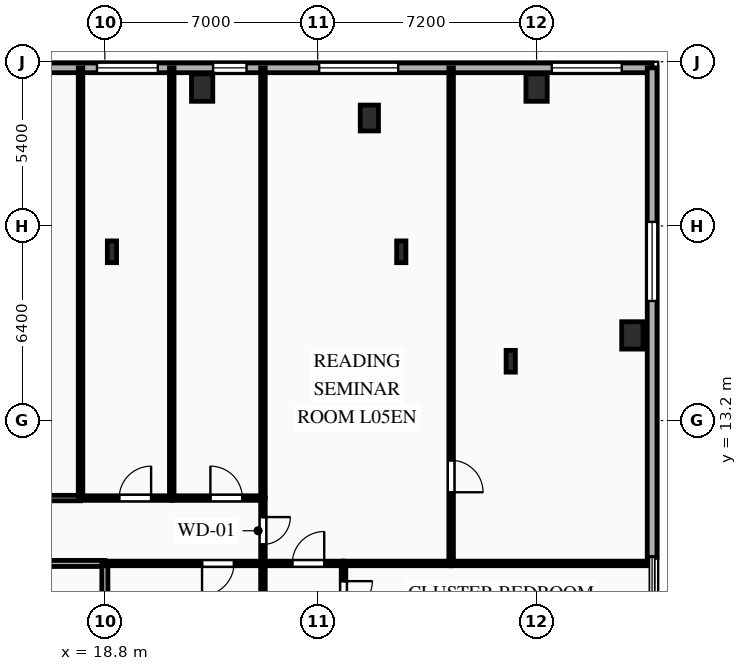
"""IFC4 building model, lengths in metres.
Left out: names, types, materials, properties, quantities, classifications, styles, units other than length and angle.
Written with IfcOpenShell. Run it as: python <this file> out.ifc"""

import sys

from ifc_helpers import new_model, si_unit, direction, frame, frame_2d, origin, origin_2d, place, context, subcontext, project, spatial, rectangle, i_section, extrude, element, fill, save


model = new_model("IFC4")
c1 = context("Model", 3, precision=1e-05, world=origin(), true_north=direction((0.0, 1.0)))
c2 = subcontext(c1, "Body", "Model", "MODEL_VIEW")
j1 = project(units=[si_unit("LENGTHUNIT", "METRE"), si_unit("PLANEANGLEUNIT", "RADIAN")], contexts=[c1])
p1 = place(None, origin())
s1 = spatial("IfcSite", under=j1, at=p1, CompositionType="ELEMENT")
p2 = place(p1, origin())
s2 = spatial("IfcBuilding", under=s1, at=p2, CompositionType="ELEMENT")
p3 = place(p2, frame((0.0, 0.0, 22.5)))
s3 = spatial("IfcBuildingStorey", under=s2, at=p3, CompositionType="ELEMENT", Elevation=22.5)
for number, where, z_axis, x_axis in (
    (1, (22.0, 24.15, 0.0), (0.0, 0.0, 1.0), (1.0, 0.0, 0.0)),
    (2, (33.0, 24.15, 0.0), (0.0, 0.0, 1.0), (1.0, 0.0, 0.0)),
    (3, (36.15, 16.0, 0.0), (0.0, 0.0, 1.0), (1.0, 0.0, 0.0)),
):
    element("IfcColumn", number, at=place(p3, frame(where, z_axis=z_axis, x_axis=x_axis)), inside=s3, PredefinedType="COLUMN", context=c2, shape_type="SweptSolid", body=[
        extrude(rectangle(XDim=0.7, YDim=0.9, at=origin_2d()), origin(), (0.0, 0.0, 1.0), 4.5),
    ])
p4 = place(p3, frame((27.5, 23.15, 0.0), z_axis=(0.0, 0.0, 1.0), x_axis=(1.0, 0.0, 0.0)))
e4 = element("IfcColumn", 4, at=p4, inside=s3, PredefinedType="PILASTER", context=c2, shape_type="SweptSolid", body=[
    extrude(rectangle(XDim=0.6, YDim=0.85, at=origin_2d()), origin(), (0.0, 0.0, 1.0), 4.5),
])
for number, where, z_axis, x_axis in (
    (5, (28.55, 18.75, 0.0), (0.0, 0.0, 1.0), (1.0, 0.0, 0.0)),
    (6, (19.033, 18.75, 0.0), (0.0, 0.0, 1.0), (1.0, 0.0, 0.0)),
    (7, (32.15, 15.15, 0.0), (0.0, 0.0, 1.0), (1.0, 0.0, 0.0)),
):
    element("IfcColumn", number, at=place(p3, frame(where, z_axis=z_axis, x_axis=x_axis)), inside=s3, PredefinedType="COLUMN", context=c2, shape_type="SweptSolid", body=[
        extrude(i_section(OverallWidth=0.304, OverallDepth=0.716, WebThickness=0.021, FlangeThickness=0.04, FilletRadius=0.027, at=origin_2d()), origin(), (0.0, 0.0, 1.0), 4.5),
    ])
p5 = place(p3, frame((-36.8, 24.8, 0.0), z_axis=(0.0, 0.0, 1.0), x_axis=(1.0, 0.0, 0.0)))
e8 = element("IfcWall", 8, at=p5, inside=s3, PredefinedType="SOLIDWALL", context=c2, shape_type="SweptSolid", body=[
    extrude(rectangle(XDim=73.6, YDim=0.32, at=frame_2d((36.8, 0.0))), origin(), (0.0, 0.0, 1.0), 4.16),
])
p6 = place(p5, frame((1.079, 0.0, 0.85)))
e9 = element("IfcOpeningElement", 9, at=p6, cuts=e8, PredefinedType="OPENING", context=c2, shape_type="SweptSolid", body=[
    extrude(rectangle(XDim=2.3, YDim=2.4, at=frame_2d((1.15, 1.2))), frame((0.0, 0.17, 0.0), z_axis=(0.0, -1.0, 0.0), x_axis=(1.0, 0.0, 0.0)), (0.0, 0.0, 1.0), 0.34),
])
p7 = place(p5, frame((8.431, 0.0, 0.85)))
e10 = element("IfcOpeningElement", 10, at=p7, cuts=e8, PredefinedType="OPENING", context=c2, shape_type="SweptSolid", body=[
    extrude(rectangle(XDim=2.6, YDim=2.4, at=frame_2d((1.3, 1.2))), frame((0.0, 0.17, 0.0), z_axis=(0.0, -1.0, 0.0), x_axis=(1.0, 0.0, 0.0)), (0.0, 0.0, 1.0), 0.34),
])
p8 = place(p5, frame((13.316, 0.0, 0.85)))
e11 = element("IfcOpeningElement", 11, at=p8, cuts=e8, PredefinedType="OPENING", context=c2, shape_type="SweptSolid", body=[
    extrude(rectangle(XDim=1.1, YDim=1.85, at=frame_2d((0.55, 0.925))), frame((0.0, 0.17, 0.0), z_axis=(0.0, -1.0, 0.0), x_axis=(1.0, 0.0, 0.0)), (0.0, 0.0, 1.0), 0.34),
])
p9 = place(p5, frame((16.339, 0.0, 0.85)))
e12 = element("IfcOpeningElement", 12, at=p9, cuts=e8, PredefinedType="OPENING", context=c2, shape_type="SweptSolid", body=[
    extrude(rectangle(XDim=2.0, YDim=2.4, at=frame_2d((1.0, 1.2))), frame((0.0, 0.17, 0.0), z_axis=(0.0, -1.0, 0.0), x_axis=(1.0, 0.0, 0.0)), (0.0, 0.0, 1.0), 0.34),
])
p10 = place(p5, frame((21.875, 0.0, 0.85)))
e13 = element("IfcOpeningElement", 13, at=p10, cuts=e8, PredefinedType="OPENING", context=c2, shape_type="SweptSolid", body=[
    extrude(rectangle(XDim=2.3, YDim=2.4, at=frame_2d((1.15, 1.2))), frame((0.0, 0.17, 0.0), z_axis=(0.0, -1.0, 0.0), x_axis=(1.0, 0.0, 0.0)), (0.0, 0.0, 1.0), 0.34),
])
p11 = place(p5, frame((26.53, 0.0, 0.85)))
e14 = element("IfcOpeningElement", 14, at=p11, cuts=e8, PredefinedType="OPENING", context=c2, shape_type="SweptSolid", body=[
    extrude(rectangle(XDim=2.6, YDim=2.4, at=frame_2d((1.3, 1.2))), frame((0.0, 0.17, 0.0), z_axis=(0.0, -1.0, 0.0), x_axis=(1.0, 0.0, 0.0)), (0.0, 0.0, 1.0), 0.34),
])
p12 = place(p5, frame((32.537, 0.0, 0.85)))
e15 = element("IfcOpeningElement", 15, at=p12, cuts=e8, PredefinedType="OPENING", context=c2, shape_type="SweptSolid", body=[
    extrude(rectangle(XDim=2.6, YDim=2.4, at=frame_2d((1.3, 1.2))), frame((0.0, 0.17, 0.0), z_axis=(0.0, -1.0, 0.0), x_axis=(1.0, 0.0, 0.0)), (0.0, 0.0, 1.0), 0.34),
])
p13 = place(p5, frame((38.543, 0.0, 0.85)))
e16 = element("IfcOpeningElement", 16, at=p13, cuts=e8, PredefinedType="OPENING", context=c2, shape_type="SweptSolid", body=[
    extrude(rectangle(XDim=2.6, YDim=2.4, at=frame_2d((1.3, 1.2))), frame((0.0, 0.17, 0.0), z_axis=(0.0, -1.0, 0.0), x_axis=(1.0, 0.0, 0.0)), (0.0, 0.0, 1.0), 0.34),
])
p14 = place(p5, frame((44.55, 0.0, 0.85)))
e17 = element("IfcOpeningElement", 17, at=p14, cuts=e8, PredefinedType="OPENING", context=c2, shape_type="SweptSolid", body=[
    extrude(rectangle(XDim=2.6, YDim=2.4, at=frame_2d((1.3, 1.2))), frame((0.0, 0.17, 0.0), z_axis=(0.0, -1.0, 0.0), x_axis=(1.0, 0.0, 0.0)), (0.0, 0.0, 1.0), 0.34),
])
p15 = place(p5, frame((50.556, 0.0, 0.85)))
e18 = element("IfcOpeningElement", 18, at=p15, cuts=e8, PredefinedType="OPENING", context=c2, shape_type="SweptSolid", body=[
    extrude(rectangle(XDim=2.6, YDim=2.4, at=frame_2d((1.3, 1.2))), frame((0.0, 0.17, 0.0), z_axis=(0.0, -1.0, 0.0), x_axis=(1.0, 0.0, 0.0)), (0.0, 0.0, 1.0), 0.34),
])
p16 = place(p5, frame((55.341, 0.0, 0.85)))
e19 = element("IfcOpeningElement", 19, at=p16, cuts=e8, PredefinedType="OPENING", context=c2, shape_type="SweptSolid", body=[
    extrude(rectangle(XDim=2.0, YDim=2.4, at=frame_2d((1.0, 1.2))), frame((0.0, 0.17, 0.0), z_axis=(0.0, -1.0, 0.0), x_axis=(1.0, 0.0, 0.0)), (0.0, 0.0, 1.0), 0.34),
])
p17 = place(p5, frame((59.16, 0.0, 0.85)))
e20 = element("IfcOpeningElement", 20, at=p17, cuts=e8, PredefinedType="OPENING", context=c2, shape_type="SweptSolid", body=[
    extrude(rectangle(XDim=1.1, YDim=1.85, at=frame_2d((0.55, 0.925))), frame((0.0, 0.17, 0.0), z_axis=(0.0, -1.0, 0.0), x_axis=(1.0, 0.0, 0.0)), (0.0, 0.0, 1.0), 0.34),
])
p18 = place(p5, frame((62.649, 0.0, 0.85)))
e21 = element("IfcOpeningElement", 21, at=p18, cuts=e8, PredefinedType="OPENING", context=c2, shape_type="SweptSolid", body=[
    extrude(rectangle(XDim=2.6, YDim=2.4, at=frame_2d((1.3, 1.2))), frame((0.0, 0.17, 0.0), z_axis=(0.0, -1.0, 0.0), x_axis=(1.0, 0.0, 0.0)), (0.0, 0.0, 1.0), 0.34),
])
p19 = place(p5, frame((70.301, 0.0, 0.85)))
e22 = element("IfcOpeningElement", 22, at=p19, cuts=e8, PredefinedType="OPENING", context=c2, shape_type="SweptSolid", body=[
    extrude(rectangle(XDim=2.3, YDim=2.4, at=frame_2d((1.15, 1.2))), frame((0.0, 0.17, 0.0), z_axis=(0.0, -1.0, 0.0), x_axis=(1.0, 0.0, 0.0)), (0.0, 0.0, 1.0), 0.34),
])
p20 = place(p3, frame((36.8, 24.8, 0.0), z_axis=(0.0, 0.0, 1.0), x_axis=(0.0, -1.0, 0.0)))
e23 = element("IfcWall", 23, at=p20, inside=s3, PredefinedType="SOLIDWALL", context=c2, shape_type="SweptSolid", body=[
    extrude(rectangle(XDim=16.1, YDim=0.32, at=frame_2d((8.05, 0.0))), origin(), (0.0, 0.0, 1.0), 4.16),
])
p21 = place(p20, frame((5.067, 0.0, 0.85)))
e24 = element("IfcOpeningElement", 24, at=p21, cuts=e23, PredefinedType="OPENING", context=c2, shape_type="SweptSolid", body=[
    extrude(rectangle(XDim=2.6, YDim=2.4, at=frame_2d((1.3, 1.2))), frame((0.0, 0.17, 0.0), z_axis=(0.0, -1.0, 0.0), x_axis=(1.0, 0.0, 0.0)), (0.0, 0.0, 1.0), 0.34),
])
p22 = place(p3, frame((18.8, 8.5, 0.0), z_axis=(0.0, 0.0, 1.0), x_axis=(-1.0, 0.0, 0.0)))
e25 = element("IfcWall", 25, at=p22, inside=s3, PredefinedType="PARTITIONING", context=c2, shape_type="SweptSolid", body=[
    extrude(rectangle(XDim=6.8, YDim=0.2, at=frame_2d((3.4, 0.0))), origin(), (0.0, 0.0, 1.0), 4.16),
])
p23 = place(p22, frame((3.985, 0.0, 0.0)))
e26 = element("IfcOpeningElement", 26, at=p23, cuts=e25, PredefinedType="OPENING", context=c2, shape_type="SweptSolid", body=[
    extrude(rectangle(XDim=1.1, YDim=2.15, at=frame_2d((0.55, 1.075))), frame((0.0, 0.11, 0.0), z_axis=(0.0, -1.0, 0.0), x_axis=(1.0, 0.0, 0.0)), (0.0, 0.0, 1.0), 0.22),
])
p24 = place(p3, frame((18.8, 5.6, 0.0), z_axis=(0.0, 0.0, 1.0), x_axis=(0.0, 1.0, 0.0)))
e27 = element("IfcWall", 27, at=p24, inside=s3, PredefinedType="PARTITIONING", context=c2, shape_type="SweptSolid", body=[
    extrude(rectangle(XDim=2.9, YDim=0.2, at=frame_2d((1.45, 0.0))), origin(), (0.0, 0.0, 1.0), 3.645),
])
p25 = place(p3, frame((24.0, 10.65, 0.0), z_axis=(0.0, 0.0, 1.0), x_axis=(0.0, -1.0, 0.0)))
e28 = element("IfcWall", 28, at=p25, inside=s3, PredefinedType="PARTITIONING", context=c2, shape_type="SweptSolid", body=[
    extrude(rectangle(XDim=2.15, YDim=0.15, at=frame_2d((1.075, 0.0))), origin(), (0.0, 0.0, 1.0), 4.16),
])
p26 = place(p25, frame((0.625, 0.0, 0.0)))
e29 = element("IfcOpeningElement", 29, at=p26, cuts=e28, PredefinedType="OPENING", context=c2, shape_type="SweptSolid", body=[
    extrude(rectangle(XDim=0.9, YDim=2.1, at=frame_2d((0.45, 1.05))), frame((0.0, 0.085, 0.0), z_axis=(0.0, -1.0, 0.0), x_axis=(1.0, 0.0, 0.0)), (0.0, 0.0, 1.0), 0.17),
])
p27 = place(p3, frame((24.0, 8.5, 0.0), z_axis=(0.0, 0.0, 1.0), x_axis=(-1.0, 0.0, 0.0)))
e30 = element("IfcWall", 30, at=p27, inside=s3, PredefinedType="PARTITIONING", context=c2, shape_type="SweptSolid", body=[
    extrude(rectangle(XDim=5.2, YDim=0.15, at=frame_2d((2.6, 0.0))), origin(), (0.0, 0.0, 1.0), 4.16),
])
p28 = place(p27, frame((0.954, 0.0, 0.0)))
e31 = element("IfcOpeningElement", 31, at=p28, cuts=e30, PredefinedType="OPENING", context=c2, shape_type="SweptSolid", body=[
    extrude(rectangle(XDim=1.05, YDim=2.15, at=frame_2d((0.525, 1.075))), frame((0.0, 0.085, 0.0), z_axis=(0.0, -1.0, 0.0), x_axis=(1.0, 0.0, 0.0)), (0.0, 0.0, 1.0), 0.17),
])
p29 = place(p3, frame((14.45, 10.65, 0.0), z_axis=(0.0, 0.0, 1.0), x_axis=(1.0, 0.0, 0.0)))
e32 = element("IfcWall", 32, at=p29, inside=s3, PredefinedType="PARTITIONING", context=c2, shape_type="SweptSolid", body=[
    extrude(rectangle(XDim=3.55, YDim=0.18, at=frame_2d((1.775, 0.0))), origin(), (0.0, 0.0, 1.0), 4.16),
])
p30 = place(p29, frame((0.754, 0.0, 0.0)))
e33 = element("IfcOpeningElement", 33, at=p30, cuts=e32, PredefinedType="OPENING", context=c2, shape_type="SweptSolid", body=[
    extrude(rectangle(XDim=1.0, YDim=2.15, at=frame_2d((0.5, 1.075))), frame((0.0, 0.1, 0.0), z_axis=(0.0, -1.0, 0.0), x_axis=(1.0, 0.0, 0.0)), (0.0, 0.0, 1.0), 0.2),
])
p31 = place(p3, frame((18.0, 10.65, 0.0), z_axis=(0.0, 0.0, 1.0), x_axis=(1.0, 0.0, 0.0)))
e34 = element("IfcWall", 34, at=p31, inside=s3, PredefinedType="PARTITIONING", context=c2, shape_type="SweptSolid", body=[
    extrude(rectangle(XDim=3.0, YDim=0.15, at=frame_2d((1.5, 0.0))), origin(), (0.0, 0.0, 1.0), 4.16),
])
p32 = place(p31, frame((1.271, 0.0, 0.0)))
e35 = element("IfcOpeningElement", 35, at=p32, cuts=e34, PredefinedType="OPENING", context=c2, shape_type="SweptSolid", body=[
    extrude(rectangle(XDim=1.05, YDim=2.15, at=frame_2d((0.525, 1.075))), frame((0.0, 0.085, 0.0), z_axis=(0.0, -1.0, 0.0), x_axis=(1.0, 0.0, 0.0)), (0.0, 0.0, 1.0), 0.17),
])
p33 = place(p3, frame((21.0, 10.65, 0.0), z_axis=(0.0, 0.0, 1.0), x_axis=(1.0, 0.0, 0.0)))
e36 = element("IfcWall", 36, at=p33, inside=s3, PredefinedType="PARTITIONING", context=c2, shape_type="SweptSolid", body=[
    extrude(rectangle(XDim=3.0, YDim=0.15, at=frame_2d((1.5, 0.0))), origin(), (0.0, 0.0, 1.0), 4.16),
])
p34 = place(p33, frame((1.271, 0.0, 0.0)))
e37 = element("IfcOpeningElement", 37, at=p34, cuts=e36, PredefinedType="OPENING", context=c2, shape_type="SweptSolid", body=[
    extrude(rectangle(XDim=1.05, YDim=2.15, at=frame_2d((0.525, 1.075))), frame((0.0, 0.085, 0.0), z_axis=(0.0, -1.0, 0.0), x_axis=(1.0, 0.0, 0.0)), (0.0, 0.0, 1.0), 0.17),
])
p35 = place(p3, frame((24.0, 8.5, 0.0), z_axis=(0.0, 0.0, 1.0), x_axis=(1.0, 0.0, 0.0)))
e38 = element("IfcWall", 38, at=p35, inside=s3, PredefinedType="PARTITIONING", context=c2, shape_type="SweptSolid", body=[
    extrude(rectangle(XDim=2.65, YDim=0.15, at=frame_2d((1.325, 0.0))), origin(), (0.0, 0.0, 1.0), 4.16),
])
p36 = place(p35, frame((0.965, 0.0, 0.0)))
e39 = element("IfcOpeningElement", 39, at=p36, cuts=e38, PredefinedType="OPENING", context=c2, shape_type="SweptSolid", body=[
    extrude(rectangle(XDim=1.05, YDim=2.15, at=frame_2d((0.525, 1.075))), frame((0.0, 0.085, 0.0), z_axis=(0.0, -1.0, 0.0), x_axis=(1.0, 0.0, 0.0)), (0.0, 0.0, 1.0), 0.17),
])
p37 = place(p3, frame((26.65, 8.5, 0.0), z_axis=(0.0, 0.0, 1.0), x_axis=(0.0, -1.0, 0.0)))
e40 = element("IfcWall", 40, at=p37, inside=s3, PredefinedType="PARTITIONING", context=c2, shape_type="SweptSolid", body=[
    extrude(rectangle(XDim=2.115, YDim=0.15, at=frame_2d((1.058, 0.0))), origin(), (0.0, 0.0, 1.0), 4.16),
])
p38 = place(p37, frame((0.583, 0.0, 0.0)))
e41 = element("IfcOpeningElement", 41, at=p38, cuts=e40, PredefinedType="OPENING", context=c2, shape_type="SweptSolid", body=[
    extrude(rectangle(XDim=0.95, YDim=2.1, at=frame_2d((0.475, 1.05))), frame((0.0, 0.085, 0.0), z_axis=(0.0, -1.0, 0.0), x_axis=(1.0, 0.0, 0.0)), (0.0, 0.0, 1.0), 0.17),
])
p39 = place(p3, frame((24.0, -5.6, 0.0), z_axis=(0.0, 0.0, 1.0), x_axis=(0.0, 1.0, 0.0)))
e42 = element("IfcWall", 42, at=p39, inside=s3, PredefinedType="PARTITIONING", context=c2, shape_type="SweptSolid", body=[
    extrude(rectangle(XDim=14.1, YDim=0.15, at=frame_2d((7.05, 0.0))), origin(), (0.0, 0.0, 1.0), 4.16),
])
p40 = place(p3, frame((30.19, 24.8, 0.0), z_axis=(0.0, 0.0, 1.0), x_axis=(0.0, -1.0, 0.0)))
e43 = element("IfcWall", 43, at=p40, inside=s3, PredefinedType="PARTITIONING", context=c2, shape_type="SweptSolid", body=[
    extrude(rectangle(XDim=16.3, YDim=0.15, at=frame_2d((8.15, 0.0))), origin(), (0.0, 0.0, 1.0), 4.16),
])
p41 = place(p40, frame((12.909, 0.0, 0.0)))
e44 = element("IfcOpeningElement", 44, at=p41, cuts=e43, PredefinedType="OPENING", context=c2, shape_type="SweptSolid", body=[
    extrude(rectangle(XDim=1.05, YDim=2.15, at=frame_2d((0.525, 1.075))), frame((0.0, 0.085, 0.0), z_axis=(0.0, -1.0, 0.0), x_axis=(1.0, 0.0, 0.0)), (0.0, 0.0, 1.0), 0.17),
])
p42 = place(p3, frame((30.19, 8.5, 0.0), z_axis=(0.0, 0.0, 1.0), x_axis=(-1.0, 0.0, 0.0)))
e45 = element("IfcWall", 45, at=p42, inside=s3, PredefinedType="PARTITIONING", context=c2, shape_type="SweptSolid", body=[
    extrude(rectangle(XDim=3.54, YDim=0.15, at=frame_2d((1.77, 0.0))), origin(), (0.0, 0.0, 1.0), 4.16),
])
p43 = place(p3, frame((24.0, 10.65, 0.0), z_axis=(0.0, 0.0, 1.0), x_axis=(0.0, 1.0, 0.0)))
e46 = element("IfcWall", 46, at=p43, inside=s3, PredefinedType="PARTITIONING", context=c2, shape_type="SweptSolid", body=[
    extrude(rectangle(XDim=14.15, YDim=0.15, at=frame_2d((7.075, 0.0))), origin(), (0.0, 0.0, 1.0), 4.16),
])
p44 = place(p3, frame((36.8, 8.5, 0.0), z_axis=(0.0, 0.0, 1.0), x_axis=(-1.0, 0.0, 0.0)))
e47 = element("IfcWall", 47, at=p44, inside=s3, PredefinedType="PARTITIONING", context=c2, shape_type="SweptSolid", body=[
    extrude(rectangle(XDim=6.61, YDim=0.15, at=frame_2d((3.305, 0.0))), origin(), (0.0, 0.0, 1.0), 4.16),
])
for number, where, z_axis, x_axis in (
    (48, (18.0, 24.8, 0.0), (0.0, 0.0, 1.0), (0.0, -1.0, 0.0)),
    (49, (21.0, 24.8, 0.0), (0.0, 0.0, 1.0), (0.0, -1.0, 0.0)),
):
    element("IfcWall", number, at=place(p3, frame(where, z_axis=z_axis, x_axis=x_axis)), inside=s3, PredefinedType="PARTITIONING", context=c2, shape_type="SweptSolid", body=[
        extrude(rectangle(XDim=14.15, YDim=0.15, at=frame_2d((7.075, 0.0))), origin(), (0.0, 0.0, 1.0), 4.16),
    ])
p45 = place(p16, origin())
e50 = element("IfcWindow", 50, at=p45, inside=s3, PartitioningType="SINGLE_PANEL", PredefinedType="WINDOW", context=c2, shape_type="SweptSolid", body=[
    extrude(rectangle(XDim=2.0, YDim=2.4, at=frame_2d((1.0, 1.2))), frame((0.0, 0.03, 0.0), z_axis=(0.0, -1.0, 0.0), x_axis=(1.0, 0.0, 0.0)), (0.0, 0.0, 1.0), 0.06),
])
fill(e19, e50)
p46 = place(p17, origin())
e51 = element("IfcWindow", 51, at=p46, inside=s3, PartitioningType="SINGLE_PANEL", PredefinedType="WINDOW", context=c2, shape_type="SweptSolid", body=[
    extrude(rectangle(XDim=1.1, YDim=1.85, at=frame_2d((0.55, 0.925))), frame((0.0, 0.03, 0.0), z_axis=(0.0, -1.0, 0.0), x_axis=(1.0, 0.0, 0.0)), (0.0, 0.0, 1.0), 0.06),
])
fill(e20, e51)
p47 = place(p18, origin())
e52 = element("IfcWindow", 52, at=p47, inside=s3, PartitioningType="SINGLE_PANEL", PredefinedType="WINDOW", context=c2, shape_type="SweptSolid", body=[
    extrude(rectangle(XDim=2.6, YDim=2.4, at=frame_2d((1.3, 1.2))), frame((0.0, 0.03, 0.0), z_axis=(0.0, -1.0, 0.0), x_axis=(1.0, 0.0, 0.0)), (0.0, 0.0, 1.0), 0.06),
])
fill(e21, e52)
p48 = place(p19, origin())
e53 = element("IfcWindow", 53, at=p48, inside=s3, PartitioningType="SINGLE_PANEL", PredefinedType="WINDOW", context=c2, shape_type="SweptSolid", body=[
    extrude(rectangle(XDim=2.3, YDim=2.4, at=frame_2d((1.15, 1.2))), frame((0.0, 0.03, 0.0), z_axis=(0.0, -1.0, 0.0), x_axis=(1.0, 0.0, 0.0)), (0.0, 0.0, 1.0), 0.06),
])
fill(e22, e53)
p49 = place(p21, origin())
e54 = element("IfcWindow", 54, at=p49, inside=s3, PartitioningType="SINGLE_PANEL", PredefinedType="WINDOW", context=c2, shape_type="SweptSolid", body=[
    extrude(rectangle(XDim=2.6, YDim=2.4, at=frame_2d((1.3, 1.2))), frame((0.0, 0.03, 0.0), z_axis=(0.0, -1.0, 0.0), x_axis=(1.0, 0.0, 0.0)), (0.0, 0.0, 1.0), 0.06),
])
fill(e24, e54)
p50 = place(p26, origin())
e55 = element("IfcDoor", 55, at=p50, inside=s3, OperationType="SINGLE_SWING_LEFT", PredefinedType="DOOR", context=c2, shape_type="SweptSolid", body=[
    extrude(rectangle(XDim=0.9, YDim=2.1, at=frame_2d((0.45, 1.05))), frame((0.0, 0.025, 0.0), z_axis=(0.0, -1.0, 0.0), x_axis=(1.0, 0.0, 0.0)), (0.0, 0.0, 1.0), 0.05),
])
fill(e29, e55)
p51 = place(p28, origin())
e56 = element("IfcDoor", 56, at=p51, inside=s3, OperationType="SINGLE_SWING_RIGHT", PredefinedType="DOOR", context=c2, shape_type="SweptSolid", body=[
    extrude(rectangle(XDim=1.05, YDim=2.15, at=frame_2d((0.525, 1.075))), frame((0.0, 0.025, 0.0), z_axis=(0.0, -1.0, 0.0), x_axis=(1.0, 0.0, 0.0)), (0.0, 0.0, 1.0), 0.05),
])
fill(e31, e56)
p52 = place(p32, origin())
e57 = element("IfcDoor", 57, at=p52, inside=s3, OperationType="SINGLE_SWING_RIGHT", PredefinedType="DOOR", context=c2, shape_type="SweptSolid", body=[
    extrude(rectangle(XDim=1.05, YDim=2.15, at=frame_2d((0.525, 1.075))), frame((0.0, 0.025, 0.0), z_axis=(0.0, -1.0, 0.0), x_axis=(1.0, 0.0, 0.0)), (0.0, 0.0, 1.0), 0.05),
])
fill(e35, e57)
p53 = place(p34, origin())
e58 = element("IfcDoor", 58, at=p53, inside=s3, OperationType="SINGLE_SWING_LEFT", PredefinedType="DOOR", context=c2, shape_type="SweptSolid", body=[
    extrude(rectangle(XDim=1.05, YDim=2.15, at=frame_2d((0.525, 1.075))), frame((0.0, 0.025, 0.0), z_axis=(0.0, -1.0, 0.0), x_axis=(1.0, 0.0, 0.0)), (0.0, 0.0, 1.0), 0.05),
])
fill(e37, e58)
p54 = place(p36, origin())
e59 = element("IfcDoor", 59, at=p54, inside=s3, OperationType="SINGLE_SWING_RIGHT", PredefinedType="DOOR", context=c2, shape_type="SweptSolid", body=[
    extrude(rectangle(XDim=1.05, YDim=2.15, at=frame_2d((0.525, 1.075))), frame((0.0, 0.025, 0.0), z_axis=(0.0, -1.0, 0.0), x_axis=(1.0, 0.0, 0.0)), (0.0, 0.0, 1.0), 0.05),
])
fill(e39, e59)
p55 = place(p38, origin())
e60 = element("IfcDoor", 60, at=p55, inside=s3, OperationType="SINGLE_SWING_LEFT", PredefinedType="DOOR", context=c2, shape_type="SweptSolid", body=[
    extrude(rectangle(XDim=0.95, YDim=2.1, at=frame_2d((0.475, 1.05))), frame((0.0, 0.025, 0.0), z_axis=(0.0, -1.0, 0.0), x_axis=(1.0, 0.0, 0.0)), (0.0, 0.0, 1.0), 0.05),
])
fill(e41, e60)
p56 = place(p41, origin())
e61 = element("IfcDoor", 61, at=p56, inside=s3, OperationType="SINGLE_SWING_RIGHT", PredefinedType="DOOR", context=c2, shape_type="SweptSolid", body=[
    extrude(rectangle(XDim=1.05, YDim=2.15, at=frame_2d((0.525, 1.075))), frame((0.0, 0.025, 0.0), z_axis=(0.0, -1.0, 0.0), x_axis=(1.0, 0.0, 0.0)), (0.0, 0.0, 1.0), 0.05),
])
fill(e44, e61)
save(model, sys.argv[1])
